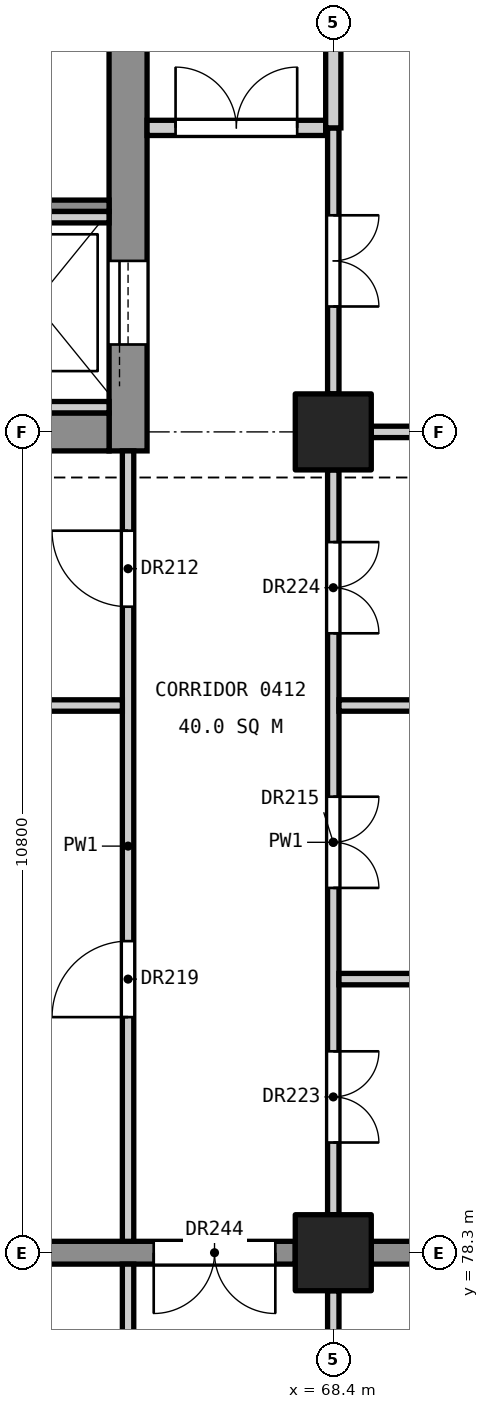
"""IFC4 building model, lengths in metres.
Left out: names, types, materials, properties, quantities, classifications, styles, units other than length and angle.
Written with IfcOpenShell. Run it as: python <this file> out.ifc"""

import sys

from ifc_helpers import new_model, si_unit, direction, frame, frame_2d, origin, origin_2d, place, context, subcontext, project, spatial, rectangle, extrude, element, fill, save


model = new_model("IFC4")
c1 = context("Model", 3, precision=1e-05, world=origin(), true_north=direction((0.0, 1.0)))
c2 = subcontext(c1, "Body", "Model", "MODEL_VIEW")
j1 = project(units=[si_unit("LENGTHUNIT", "METRE"), si_unit("PLANEANGLEUNIT", "RADIAN")], contexts=[c1])
p1 = place(None, origin())
s1 = spatial("IfcSite", under=j1, at=p1, CompositionType="ELEMENT")
p2 = place(p1, origin())
s2 = spatial("IfcBuilding", under=s1, at=p2, CompositionType="ELEMENT")
p3 = place(p2, frame((0.0, 0.0, 22.2)))
s3 = spatial("IfcBuildingStorey", under=s2, at=p3, CompositionType="ELEMENT", Elevation=22.2)
for number, where, z_axis, x_axis in (
    (1, (68.4, 78.3, 0.0), (0.0, 0.0, 1.0), (1.0, 0.0, 0.0)),
    (2, (68.4, 89.1, 0.0), (0.0, 0.0, 1.0), (1.0, 0.0, 0.0)),
):
    element("IfcColumn", number, at=place(p3, frame(where, z_axis=z_axis, x_axis=x_axis)), inside=s3, PredefinedType="COLUMN", context=c2, shape_type="SweptSolid", body=[
        extrude(rectangle(XDim=1.0, YDim=1.0, at=origin_2d()), origin(), (0.0, 0.0, 1.0), 4.8),
    ])
p4 = place(p3, frame((65.7, 88.85, 0.0), z_axis=(0.0, 0.0, 1.0), x_axis=(0.0, 1.0, 0.0)))
e3 = element("IfcWall", 3, at=p4, inside=s3, PredefinedType="SHEAR", context=c2, shape_type="SweptSolid", body=[
    extrude(rectangle(XDim=11.3, YDim=0.5, at=frame_2d((5.65, 0.0))), origin(), (0.0, 0.0, 1.0), 4.55),
])
p5 = place(p4, frame((9.35, 0.0, 0.0)))
e4 = element("IfcOpeningElement", 4, at=p5, cuts=e3, PredefinedType="OPENING", context=c2, shape_type="SweptSolid", body=[
    extrude(rectangle(XDim=1.4, YDim=2.1, at=frame_2d((0.7, 1.05))), frame((0.0, 0.26, 0.0), z_axis=(0.0, -1.0, 0.0), x_axis=(1.0, 0.0, 0.0)), (0.0, 0.0, 1.0), 0.52),
])
p6 = place(p4, frame((1.4, 0.0, 0.0)))
e5 = element("IfcOpeningElement", 5, at=p6, cuts=e3, PredefinedType="OPENING", context=c2, shape_type="SweptSolid", body=[
    extrude(rectangle(XDim=1.1, YDim=2.1, at=frame_2d((0.55, 1.05))), frame((0.0, 0.26, 0.0), z_axis=(0.0, -1.0, 0.0), x_axis=(1.0, 0.0, 0.0)), (0.0, 0.0, 1.0), 0.52),
])
p7 = place(p3, frame((61.45, 89.1, 0.0), z_axis=(0.0, 0.0, 1.0), x_axis=(1.0, 0.0, 0.0)))
e6 = element("IfcWall", 6, at=p7, inside=s3, PredefinedType="SHEAR", context=c2, shape_type="SweptSolid", body=[
    extrude(rectangle(XDim=4.0, YDim=0.5, at=frame_2d((2.0, 0.0))), origin(), (0.0, 0.0, 1.0), 4.55),
])
p8 = place(p3, frame((61.7, 78.3, 0.0), z_axis=(0.0, 0.0, 1.0), x_axis=(1.0, 0.0, 0.0)))
e7 = element("IfcWall", 7, at=p8, inside=s3, PredefinedType="SHEAR", context=c2, shape_type="SweptSolid", body=[
    extrude(rectangle(XDim=6.2, YDim=0.3, at=frame_2d((3.1, 0.0))), origin(), (0.0, 0.0, 1.0), 4.55),
])
p9 = place(p8, frame((4.337, 0.0, 0.0)))
e8 = element("IfcOpeningElement", 8, at=p9, cuts=e7, PredefinedType="OPENING", context=c2, shape_type="SweptSolid", body=[
    extrude(rectangle(XDim=1.6, YDim=2.1, at=frame_2d((0.8, 1.05))), frame((0.0, 0.16, 0.0), z_axis=(0.0, -1.0, 0.0), x_axis=(1.0, 0.0, 0.0)), (0.0, 0.0, 1.0), 0.32),
])
p10 = place(p3, frame((68.9, 78.3, 0.0), z_axis=(0.0, 0.0, 1.0), x_axis=(1.0, 0.0, 0.0)))
e9 = element("IfcWall", 9, at=p10, inside=s3, PredefinedType="SHEAR", context=c2, shape_type="SweptSolid", body=[
    extrude(rectangle(XDim=9.8, YDim=0.3, at=frame_2d((4.9, 0.0))), origin(), (0.0, 0.0, 1.0), 4.55),
])
p11 = place(p3, frame((61.45, 92.075, 0.0), z_axis=(0.0, 0.0, 1.0), x_axis=(1.0, 0.0, 0.0)))
e10 = element("IfcWall", 10, at=p11, inside=s3, PredefinedType="SOLIDWALL", context=c2, shape_type="SweptSolid", body=[
    extrude(rectangle(XDim=4.0, YDim=0.15, at=frame_2d((2.0, 0.0))), origin(), (0.0, 0.0, 1.0), 4.55),
])
for number, where, z_axis, x_axis in (
    (11, (63.65, 91.925, 0.0), (0.0, 0.0, 1.0), (1.0, 0.0, 0.0)),
    (12, (63.65, 89.425, 0.0), (0.0, 0.0, 1.0), (1.0, 0.0, 0.0)),
):
    element("IfcWall", number, at=place(p3, frame(where, z_axis=z_axis, x_axis=x_axis)), inside=s3, PredefinedType="SOLIDWALL", context=c2, shape_type="SweptSolid", body=[
        extrude(rectangle(XDim=1.8, YDim=0.15, at=frame_2d((0.9, 0.0))), origin(), (0.0, 0.0, 1.0), 4.8),
    ])
p12 = place(p3, frame((65.7, 74.95, 0.0), z_axis=(0.0, 0.0, 1.0), x_axis=(0.0, 1.0, 0.0)))
e13 = element("IfcWall", 13, at=p12, inside=s3, PredefinedType="PARTITIONING", context=c2, shape_type="SweptSolid", body=[
    extrude(rectangle(XDim=3.2, YDim=0.15, at=frame_2d((1.6, 0.0))), origin(), (0.0, 0.0, 1.0), 3.55),
])
p13 = place(p12, frame((1.05, 0.0, 0.0)))
e14 = element("IfcOpeningElement", 14, at=p13, cuts=e13, PredefinedType="OPENING", context=c2, shape_type="SweptSolid", body=[
    extrude(rectangle(XDim=1.0, YDim=2.1, at=frame_2d((0.5, 1.05))), frame((0.0, 0.085, 0.0), z_axis=(0.0, -1.0, 0.0), x_axis=(1.0, 0.0, 0.0)), (0.0, 0.0, 1.0), 0.17),
])
p14 = place(p3, frame((65.7, 78.45, 0.0), z_axis=(0.0, 0.0, 1.0), x_axis=(0.0, 1.0, 0.0)))
e15 = element("IfcWall", 15, at=p14, inside=s3, PredefinedType="PARTITIONING", context=c2, shape_type="SweptSolid", body=[
    extrude(rectangle(XDim=10.4, YDim=0.15, at=frame_2d((5.2, 0.0))), origin(), (0.0, 0.0, 1.0), 3.55),
])
p15 = place(p14, frame((8.35, 0.0, 0.0)))
e16 = element("IfcOpeningElement", 16, at=p15, cuts=e15, PredefinedType="OPENING", context=c2, shape_type="SweptSolid", body=[
    extrude(rectangle(XDim=1.0, YDim=2.1, at=frame_2d((0.5, 1.05))), frame((0.0, 0.085, 0.0), z_axis=(0.0, -1.0, 0.0), x_axis=(1.0, 0.0, 0.0)), (0.0, 0.0, 1.0), 0.17),
])
p16 = place(p14, frame((2.95, 0.0, 0.0)))
e17 = element("IfcOpeningElement", 17, at=p16, cuts=e15, PredefinedType="OPENING", context=c2, shape_type="SweptSolid", body=[
    extrude(rectangle(XDim=1.0, YDim=2.1, at=frame_2d((0.5, 1.05))), frame((0.0, 0.085, 0.0), z_axis=(0.0, -1.0, 0.0), x_axis=(1.0, 0.0, 0.0)), (0.0, 0.0, 1.0), 0.17),
])
p17 = place(p3, frame((61.35, 85.5, 0.0), z_axis=(0.0, 0.0, 1.0), x_axis=(1.0, 0.0, 0.0)))
e18 = element("IfcWall", 18, at=p17, inside=s3, PredefinedType="PARTITIONING", context=c2, shape_type="SweptSolid", body=[
    extrude(rectangle(XDim=4.275, YDim=0.15, at=frame_2d((2.137, 0.0))), origin(), (0.0, 0.0, 1.0), 3.85),
])
p18 = place(p3, frame((65.95, 93.1, 0.0), z_axis=(0.0, 0.0, 1.0), x_axis=(1.0, 0.0, 0.0)))
e19 = element("IfcWall", 19, at=p18, inside=s3, PredefinedType="PARTITIONING", context=c2, shape_type="SweptSolid", body=[
    extrude(rectangle(XDim=2.35, YDim=0.2, at=frame_2d((1.175, 0.0))), origin(), (0.0, 0.0, 1.0), 3.55),
])
p19 = place(p18, frame((0.375, 0.0, 0.0)))
e20 = element("IfcOpeningElement", 20, at=p19, cuts=e19, PredefinedType="OPENING", context=c2, shape_type="SweptSolid", body=[
    extrude(rectangle(XDim=1.6, YDim=2.1, at=frame_2d((0.8, 1.05))), frame((0.0, 0.11, 0.0), z_axis=(0.0, -1.0, 0.0), x_axis=(1.0, 0.0, 0.0)), (0.0, 0.0, 1.0), 0.22),
])
p20 = place(p3, frame((68.4, 70.8, 0.0), z_axis=(0.0, 0.0, 1.0), x_axis=(0.0, 1.0, 0.0)))
e21 = element("IfcWall", 21, at=p20, inside=s3, PredefinedType="PARTITIONING", context=c2, shape_type="SweptSolid", body=[
    extrude(rectangle(XDim=7.0, YDim=0.15, at=frame_2d((3.5, 0.0))), origin(), (0.0, 0.0, 1.0), 3.55),
])
p21 = place(p20, frame((2.9, 0.0, 0.0)))
e22 = element("IfcOpeningElement", 22, at=p21, cuts=e21, PredefinedType="OPENING", context=c2, shape_type="SweptSolid", body=[
    extrude(rectangle(XDim=1.2, YDim=2.1, at=frame_2d((0.6, 1.05))), frame((0.0, 0.085, 0.0), z_axis=(0.0, -1.0, 0.0), x_axis=(1.0, 0.0, 0.0)), (0.0, 0.0, 1.0), 0.17),
])
p22 = place(p3, frame((68.4, 78.8, 0.0), z_axis=(0.0, 0.0, 1.0), x_axis=(0.0, 1.0, 0.0)))
e23 = element("IfcWall", 23, at=p22, inside=s3, PredefinedType="PARTITIONING", context=c2, shape_type="SweptSolid", body=[
    extrude(rectangle(XDim=9.8, YDim=0.15, at=frame_2d((4.9, 0.0))), origin(), (0.0, 0.0, 1.0), 3.55),
])
p23 = place(p22, frame((4.3, 0.0, 0.0)))
e24 = element("IfcOpeningElement", 24, at=p23, cuts=e23, PredefinedType="OPENING", context=c2, shape_type="SweptSolid", body=[
    extrude(rectangle(XDim=1.2, YDim=2.1, at=frame_2d((0.6, 1.05))), frame((0.0, 0.085, 0.0), z_axis=(0.0, -1.0, 0.0), x_axis=(1.0, 0.0, 0.0)), (0.0, 0.0, 1.0), 0.17),
])
p24 = place(p22, frame((0.95, 0.0, 0.0)))
e25 = element("IfcOpeningElement", 25, at=p24, cuts=e23, PredefinedType="OPENING", context=c2, shape_type="SweptSolid", body=[
    extrude(rectangle(XDim=1.2, YDim=2.1, at=frame_2d((0.6, 1.05))), frame((0.0, 0.085, 0.0), z_axis=(0.0, -1.0, 0.0), x_axis=(1.0, 0.0, 0.0)), (0.0, 0.0, 1.0), 0.17),
])
p25 = place(p22, frame((7.65, 0.0, 0.0)))
e26 = element("IfcOpeningElement", 26, at=p25, cuts=e23, PredefinedType="OPENING", context=c2, shape_type="SweptSolid", body=[
    extrude(rectangle(XDim=1.2, YDim=2.1, at=frame_2d((0.6, 1.05))), frame((0.0, 0.085, 0.0), z_axis=(0.0, -1.0, 0.0), x_axis=(1.0, 0.0, 0.0)), (0.0, 0.0, 1.0), 0.17),
])
p26 = place(p3, frame((68.4, 89.6, 0.0), z_axis=(0.0, 0.0, 1.0), x_axis=(0.0, 1.0, 0.0)))
e27 = element("IfcWall", 27, at=p26, inside=s3, PredefinedType="PARTITIONING", context=c2, shape_type="SweptSolid", body=[
    extrude(rectangle(XDim=3.5, YDim=0.15, at=frame_2d((1.75, 0.0))), origin(), (0.0, 0.0, 1.0), 3.55),
])
p27 = place(p26, frame((1.15, 0.0, 0.0)))
e28 = element("IfcOpeningElement", 28, at=p27, cuts=e27, PredefinedType="OPENING", context=c2, shape_type="SweptSolid", body=[
    extrude(rectangle(XDim=1.2, YDim=2.1, at=frame_2d((0.6, 1.05))), frame((0.0, 0.085, 0.0), z_axis=(0.0, -1.0, 0.0), x_axis=(1.0, 0.0, 0.0)), (0.0, 0.0, 1.0), 0.17),
])
p28 = place(p3, frame((68.4, 93.1, 0.0), z_axis=(0.0, 0.0, 1.0), x_axis=(0.0, 1.0, 0.0)))
e29 = element("IfcWall", 29, at=p28, inside=s3, PredefinedType="PARTITIONING", context=c2, shape_type="SweptSolid", body=[
    extrude(rectangle(XDim=6.3, YDim=0.2, at=frame_2d((3.15, 0.0))), origin(), (0.0, 0.0, 1.0), 3.55),
])
for number, where, z_axis, x_axis in (
    (30, (68.475, 81.9, 0.0), (0.0, 0.0, 1.0), (1.0, 0.0, 0.0)),
    (31, (68.475, 85.5, 0.0), (0.0, 0.0, 1.0), (1.0, 0.0, 0.0)),
):
    element("IfcWall", number, at=place(p3, frame(where, z_axis=z_axis, x_axis=x_axis)), inside=s3, PredefinedType="PARTITIONING", context=c2, shape_type="SweptSolid", body=[
        extrude(rectangle(XDim=10.575, YDim=0.15, at=frame_2d((5.288, 0.0))), origin(), (0.0, 0.0, 1.0), 3.85),
    ])
p29 = place(p3, frame((68.9, 89.1, 0.0), z_axis=(0.0, 0.0, 1.0), x_axis=(1.0, 0.0, 0.0)))
e32 = element("IfcWall", 32, at=p29, inside=s3, PredefinedType="PARTITIONING", context=c2, shape_type="SweptSolid", body=[
    extrude(rectangle(XDim=9.8, YDim=0.15, at=frame_2d((4.9, 0.0))), origin(), (0.0, 0.0, 1.0), 3.85),
])
p30 = place(p6, origin())
e33 = element("IfcDoor", 33, at=p30, inside=s3, OperationType="SLIDING_TO_LEFT", PredefinedType="DOOR", context=c2, shape_type="SweptSolid", body=[
    extrude(rectangle(XDim=1.1, YDim=2.1, at=frame_2d((0.55, 1.05))), frame((0.0, 0.025, 0.0), z_axis=(0.0, -1.0, 0.0), x_axis=(1.0, 0.0, 0.0)), (0.0, 0.0, 1.0), 0.05),
])
fill(e5, e33)
p31 = place(p15, origin())
e34 = element("IfcDoor", 34, at=p31, inside=s3, OperationType="SINGLE_SWING_RIGHT", PredefinedType="DOOR", context=c2, shape_type="SweptSolid", body=[
    extrude(rectangle(XDim=1.0, YDim=2.1, at=frame_2d((0.5, 1.05))), frame((0.0, 0.025, 0.0), z_axis=(0.0, -1.0, 0.0), x_axis=(1.0, 0.0, 0.0)), (0.0, 0.0, 1.0), 0.05),
])
fill(e16, e34)
p32 = place(p23, frame((1.2, 0.0, 0.0), z_axis=(0.0, 0.0, 1.0), x_axis=(-1.0, 0.0, 0.0)))
e35 = element("IfcDoor", 35, at=p32, inside=s3, OperationType="DOUBLE_DOOR_SINGLE_SWING", PredefinedType="DOOR", context=c2, shape_type="SweptSolid", body=[
    extrude(rectangle(XDim=1.2, YDim=2.1, at=frame_2d((0.6, 1.05))), frame((0.0, 0.025, 0.0), z_axis=(0.0, -1.0, 0.0), x_axis=(1.0, 0.0, 0.0)), (0.0, 0.0, 1.0), 0.05),
])
fill(e24, e35)
p33 = place(p27, frame((1.2, 0.0, 0.0), z_axis=(0.0, 0.0, 1.0), x_axis=(-1.0, 0.0, 0.0)))
e36 = element("IfcDoor", 36, at=p33, inside=s3, OperationType="DOUBLE_DOOR_SINGLE_SWING", PredefinedType="DOOR", context=c2, shape_type="SweptSolid", body=[
    extrude(rectangle(XDim=1.2, YDim=2.1, at=frame_2d((0.6, 1.05))), frame((0.0, 0.025, 0.0), z_axis=(0.0, -1.0, 0.0), x_axis=(1.0, 0.0, 0.0)), (0.0, 0.0, 1.0), 0.05),
])
fill(e28, e36)
p34 = place(p16, origin())
e37 = element("IfcDoor", 37, at=p34, inside=s3, OperationType="SINGLE_SWING_LEFT", PredefinedType="DOOR", context=c2, shape_type="SweptSolid", body=[
    extrude(rectangle(XDim=1.0, YDim=2.1, at=frame_2d((0.5, 1.05))), frame((0.0, 0.025, 0.0), z_axis=(0.0, -1.0, 0.0), x_axis=(1.0, 0.0, 0.0)), (0.0, 0.0, 1.0), 0.05),
])
fill(e17, e37)
p35 = place(p24, frame((1.2, 0.0, 0.0), z_axis=(0.0, 0.0, 1.0), x_axis=(-1.0, 0.0, 0.0)))
e38 = element("IfcDoor", 38, at=p35, inside=s3, OperationType="DOUBLE_DOOR_SINGLE_SWING", PredefinedType="DOOR", context=c2, shape_type="SweptSolid", body=[
    extrude(rectangle(XDim=1.2, YDim=2.1, at=frame_2d((0.6, 1.05))), frame((0.0, 0.025, 0.0), z_axis=(0.0, -1.0, 0.0), x_axis=(1.0, 0.0, 0.0)), (0.0, 0.0, 1.0), 0.05),
])
fill(e25, e38)
p36 = place(p25, frame((1.2, 0.0, 0.0), z_axis=(0.0, 0.0, 1.0), x_axis=(-1.0, 0.0, 0.0)))
e39 = element("IfcDoor", 39, at=p36, inside=s3, OperationType="DOUBLE_DOOR_SINGLE_SWING", PredefinedType="DOOR", context=c2, shape_type="SweptSolid", body=[
    extrude(rectangle(XDim=1.2, YDim=2.1, at=frame_2d((0.6, 1.05))), frame((0.0, 0.025, 0.0), z_axis=(0.0, -1.0, 0.0), x_axis=(1.0, 0.0, 0.0)), (0.0, 0.0, 1.0), 0.05),
])
fill(e26, e39)
p37 = place(p19, origin())
e40 = element("IfcDoor", 40, at=p37, inside=s3, OperationType="DOUBLE_DOOR_SINGLE_SWING", PredefinedType="DOOR", context=c2, shape_type="SweptSolid", body=[
    extrude(rectangle(XDim=1.6, YDim=2.1, at=frame_2d((0.8, 1.05))), frame((0.0, 0.025, 0.0), z_axis=(0.0, -1.0, 0.0), x_axis=(1.0, 0.0, 0.0)), (0.0, 0.0, 1.0), 0.05),
])
fill(e20, e40)
p38 = place(p9, frame((1.6, 0.0, 0.0), z_axis=(0.0, 0.0, 1.0), x_axis=(-1.0, 0.0, 0.0)))
e41 = element("IfcDoor", 41, at=p38, inside=s3, OperationType="DOUBLE_DOOR_SINGLE_SWING", PredefinedType="DOOR", context=c2, shape_type="SweptSolid", body=[
    extrude(rectangle(XDim=1.6, YDim=2.1, at=frame_2d((0.8, 1.05))), frame((0.0, 0.025, 0.0), z_axis=(0.0, -1.0, 0.0), x_axis=(1.0, 0.0, 0.0)), (0.0, 0.0, 1.0), 0.05),
])
fill(e8, e41)
save(model, sys.argv[1])
